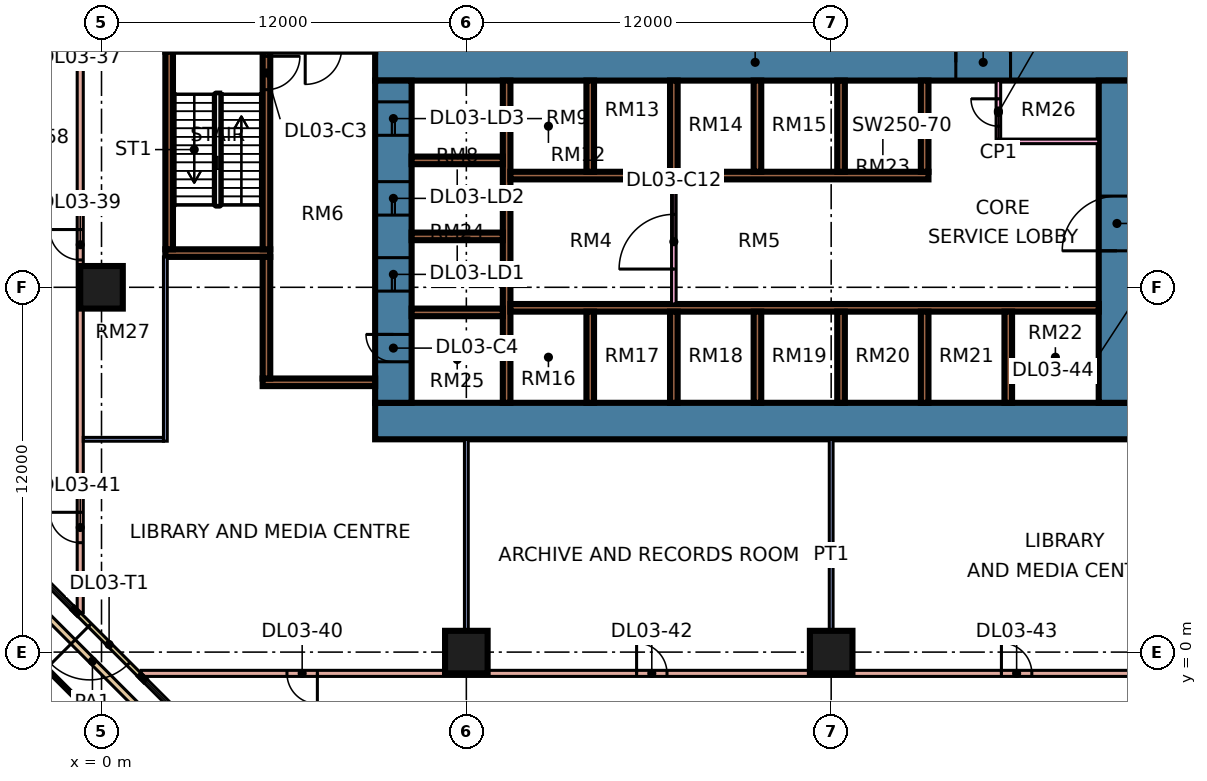
"""IFC4 building model, lengths in metres.
Left out: names, types, materials, properties, quantities, classifications, styles, units other than length and angle.
Written with IfcOpenShell. Run it as: python <this file> out.ifc"""

import sys

from ifc_helpers import new_model, si_unit, direction, frame, frame_2d, origin, origin_2d, place, context, subcontext, project, spatial, rectangle, extrude, element, fill, save


model = new_model("IFC4")
c1 = context("Model", 3, precision=1e-05, world=origin(), true_north=direction((0.0, 1.0)))
c2 = subcontext(c1, "Body", "Model", "MODEL_VIEW")
j1 = project(units=[si_unit("LENGTHUNIT", "METRE"), si_unit("PLANEANGLEUNIT", "RADIAN")], contexts=[c1])
p1 = place(None, origin())
s1 = spatial("IfcSite", under=j1, at=p1, CompositionType="ELEMENT")
p2 = place(p1, origin())
s2 = spatial("IfcBuilding", under=s1, at=p2, CompositionType="ELEMENT")
p3 = place(p2, frame((0.0, 0.0, 16.8)))
s3 = spatial("IfcBuildingStorey", under=s2, at=p3, CompositionType="ELEMENT", Elevation=16.8)
for number, where, z_axis, x_axis in (
    (1, (12.0, 0.0, 0.0), (0.0, 0.0, 1.0), (1.0, 0.0, 0.0)),
    (2, (24.0, 0.0, 0.0), (0.0, 0.0, 1.0), (1.0, 0.0, 0.0)),
    (3, (0.0, 12.0, 0.0), (0.0, 0.0, 1.0), (1.0, 0.0, 0.0)),
):
    element("IfcColumn", number, at=place(p3, frame(where, z_axis=z_axis, x_axis=x_axis)), inside=s3, PredefinedType="COLUMN", context=c2, shape_type="SweptSolid", body=[
        extrude(rectangle(XDim=1.4, YDim=1.4, at=origin_2d()), origin(), (0.0, 0.0, 1.0), 4.8),
    ])
p4 = place(p3, frame((9.0, 7.6, 0.0), z_axis=(0.0, 0.0, 1.0), x_axis=(1.0, 0.0, 0.0)))
e4 = element("IfcWall", 4, at=p4, inside=s3, PredefinedType="SHEAR", context=c2, shape_type="SweptSolid", body=[
    extrude(rectangle(XDim=25.0, YDim=1.2, at=frame_2d((12.5, 0.0))), origin(), (0.0, 0.0, 1.0), 4.8),
])
p5 = place(p3, frame((9.0, 19.4, 0.0), z_axis=(0.0, 0.0, 1.0), x_axis=(1.0, 0.0, 0.0)))
e5 = element("IfcWall", 5, at=p5, inside=s3, PredefinedType="SHEAR", context=c2, shape_type="SweptSolid", body=[
    extrude(rectangle(XDim=25.0, YDim=1.2, at=frame_2d((12.5, 0.0))), origin(), (0.0, 0.0, 1.0), 4.8),
])
p6 = place(p5, frame((19.1, 0.0, 0.0)))
e6 = element("IfcOpeningElement", 6, at=p6, cuts=e5, PredefinedType="OPENING", context=c2, shape_type="SweptSolid", body=[
    extrude(rectangle(XDim=1.8, YDim=2.4, at=frame_2d((0.9, 1.2))), frame((0.0, 0.61, 0.0), z_axis=(0.0, -1.0, 0.0), x_axis=(1.0, 0.0, 0.0)), (0.0, 0.0, 1.0), 1.22),
])
p7 = place(p3, frame((9.6, 8.2, 0.0), z_axis=(0.0, 0.0, 1.0), x_axis=(0.0, 1.0, 0.0)))
e7 = element("IfcWall", 7, at=p7, inside=s3, PredefinedType="SHEAR", context=c2, shape_type="SweptSolid", body=[
    extrude(rectangle(XDim=10.6, YDim=1.2, at=frame_2d((5.3, 0.0))), origin(), (0.0, 0.0, 1.0), 4.8),
])
p8 = place(p7, frame((3.675, 0.0, 0.0)))
e8 = element("IfcOpeningElement", 8, at=p8, cuts=e7, PredefinedType="OPENING", context=c2, shape_type="SweptSolid", body=[
    extrude(rectangle(XDim=1.1, YDim=2.2, at=frame_2d((0.55, 1.1))), frame((0.0, 0.61, 0.0), z_axis=(0.0, -1.0, 0.0), x_axis=(1.0, 0.0, 0.0)), (0.0, 0.0, 1.0), 1.22),
])
p9 = place(p7, frame((6.175, 0.0, 0.0)))
e9 = element("IfcOpeningElement", 9, at=p9, cuts=e7, PredefinedType="OPENING", context=c2, shape_type="SweptSolid", body=[
    extrude(rectangle(XDim=1.1, YDim=2.2, at=frame_2d((0.55, 1.1))), frame((0.0, 0.61, 0.0), z_axis=(0.0, -1.0, 0.0), x_axis=(1.0, 0.0, 0.0)), (0.0, 0.0, 1.0), 1.22),
])
p10 = place(p7, frame((8.8, 0.0, 0.0)))
e10 = element("IfcOpeningElement", 10, at=p10, cuts=e7, PredefinedType="OPENING", context=c2, shape_type="SweptSolid", body=[
    extrude(rectangle(XDim=1.1, YDim=2.2, at=frame_2d((0.55, 1.1))), frame((0.0, 0.61, 0.0), z_axis=(0.0, -1.0, 0.0), x_axis=(1.0, 0.0, 0.0)), (0.0, 0.0, 1.0), 1.22),
])
p11 = place(p7, frame((1.35, 0.0, 0.0)))
e11 = element("IfcOpeningElement", 11, at=p11, cuts=e7, PredefinedType="OPENING", context=c2, shape_type="SweptSolid", body=[
    extrude(rectangle(XDim=0.9, YDim=2.1, at=frame_2d((0.45, 1.05))), frame((0.0, 0.61, 0.0), z_axis=(0.0, -1.0, 0.0), x_axis=(1.0, 0.0, 0.0)), (0.0, 0.0, 1.0), 1.22),
])
p12 = place(p3, frame((33.4, 8.2, 0.0), z_axis=(0.0, 0.0, 1.0), x_axis=(0.0, 1.0, 0.0)))
e12 = element("IfcWall", 12, at=p12, inside=s3, PredefinedType="SHEAR", context=c2, shape_type="SweptSolid", body=[
    extrude(rectangle(XDim=10.6, YDim=1.2, at=frame_2d((5.3, 0.0))), origin(), (0.0, 0.0, 1.0), 4.8),
])
p13 = place(p12, frame((5.0, 0.0, 0.0)))
e13 = element("IfcOpeningElement", 13, at=p13, cuts=e12, PredefinedType="OPENING", context=c2, shape_type="SweptSolid", body=[
    extrude(rectangle(XDim=1.8, YDim=2.4, at=frame_2d((0.9, 1.2))), frame((0.0, 0.61, 0.0), z_axis=(0.0, -1.0, 0.0), x_axis=(1.0, 0.0, 0.0)), (0.0, 0.0, 1.0), 1.22),
])
p14 = place(p3, frame((13.325, 8.2, 0.0), z_axis=(0.0, 0.0, 1.0), x_axis=(0.0, 1.0, 0.0)))
e14 = element("IfcWall", 14, at=p14, inside=s3, PredefinedType="SHEAR", context=c2, shape_type="SweptSolid", body=[
    extrude(rectangle(XDim=10.6, YDim=0.25, at=frame_2d((5.3, 0.0))), origin(), (0.0, 0.0, 1.0), 4.8),
])
p15 = place(p3, frame((13.45, 11.325, 0.0), z_axis=(0.0, 0.0, 1.0), x_axis=(1.0, 0.0, 0.0)))
e15 = element("IfcWall", 15, at=p15, inside=s3, PredefinedType="SHEAR", context=c2, shape_type="SweptSolid", body=[
    extrude(rectangle(XDim=19.35, YDim=0.25, at=frame_2d((9.675, 0.0))), origin(), (0.0, 0.0, 1.0), 4.8),
])
p16 = place(p3, frame((13.45, 15.675, 0.0), z_axis=(0.0, 0.0, 1.0), x_axis=(1.0, 0.0, 0.0)))
e16 = element("IfcWall", 16, at=p16, inside=s3, PredefinedType="SHEAR", context=c2, shape_type="SweptSolid", body=[
    extrude(rectangle(XDim=13.75, YDim=0.25, at=frame_2d((6.875, 0.0))), origin(), (0.0, 0.0, 1.0), 4.8),
])
for number, where, z_axis, x_axis in (
    (17, (10.2, 11.175, 0.0), (0.0, 0.0, 1.0), (1.0, 0.0, 0.0)),
    (18, (10.2, 13.675, 0.0), (0.0, 0.0, 1.0), (1.0, 0.0, 0.0)),
    (19, (10.2, 16.175, 0.0), (0.0, 0.0, 1.0), (1.0, 0.0, 0.0)),
    (20, (16.075, 8.2, 0.0), (0.0, 0.0, 1.0), (0.0, 1.0, 0.0)),
    (21, (18.825, 8.2, 0.0), (0.0, 0.0, 1.0), (0.0, 1.0, 0.0)),
    (22, (21.575, 8.2, 0.0), (0.0, 0.0, 1.0), (0.0, 1.0, 0.0)),
    (23, (24.325, 8.2, 0.0), (0.0, 0.0, 1.0), (0.0, 1.0, 0.0)),
    (24, (27.075, 8.2, 0.0), (0.0, 0.0, 1.0), (0.0, 1.0, 0.0)),
    (25, (29.825, 8.2, 0.0), (0.0, 0.0, 1.0), (0.0, 1.0, 0.0)),
    (26, (16.075, 15.8, 0.0), (0.0, 0.0, 1.0), (0.0, 1.0, 0.0)),
    (27, (18.825, 15.8, 0.0), (0.0, 0.0, 1.0), (0.0, 1.0, 0.0)),
    (28, (21.575, 15.8, 0.0), (0.0, 0.0, 1.0), (0.0, 1.0, 0.0)),
    (29, (24.325, 15.8, 0.0), (0.0, 0.0, 1.0), (0.0, 1.0, 0.0)),
    (30, (27.075, 15.8, 0.0), (0.0, 0.0, 1.0), (0.0, 1.0, 0.0)),
):
    element("IfcWall", number, at=place(p3, frame(where, z_axis=z_axis, x_axis=x_axis)), inside=s3, PredefinedType="SHEAR", context=c2, shape_type="SweptSolid", body=[
        extrude(rectangle(XDim=3.0, YDim=0.25, at=frame_2d((1.5, 0.0))), origin(), (0.0, 0.0, 1.0), 4.8),
    ])
p17 = place(p3, frame((2.1, 13.125, 0.0), z_axis=(0.0, 0.0, 1.0), x_axis=(1.0, 0.0, 0.0)))
e31 = element("IfcWall", 31, at=p17, inside=s3, PredefinedType="SHEAR", context=c2, shape_type="SweptSolid", body=[
    extrude(rectangle(XDim=3.45, YDim=0.25, at=frame_2d((1.725, 0.0))), origin(), (0.0, 0.0, 1.0), 4.8),
])
p18 = place(p3, frame((2.225, 13.25, 0.0), z_axis=(0.0, 0.0, 1.0), x_axis=(0.0, 1.0, 0.0)))
e32 = element("IfcWall", 32, at=p18, inside=s3, PredefinedType="SHEAR", context=c2, shape_type="SweptSolid", body=[
    extrude(rectangle(XDim=6.5, YDim=0.25, at=frame_2d((3.25, 0.0))), origin(), (0.0, 0.0, 1.0), 4.8),
])
p19 = place(p3, frame((5.425, 13.25, 0.0), z_axis=(0.0, 0.0, 1.0), x_axis=(0.0, 1.0, 0.0)))
e33 = element("IfcWall", 33, at=p19, inside=s3, PredefinedType="SHEAR", context=c2, shape_type="SweptSolid", body=[
    extrude(rectangle(XDim=6.5, YDim=0.25, at=frame_2d((3.25, 0.0))), origin(), (0.0, 0.0, 1.0), 4.8),
])
p20 = place(p19, frame((5.25, 0.0, 0.0)))
e34 = element("IfcOpeningElement", 34, at=p20, cuts=e33, PredefinedType="OPENING", context=c2, shape_type="SweptSolid", body=[
    extrude(rectangle(XDim=1.1, YDim=2.2, at=frame_2d((0.55, 1.1))), frame((0.0, 0.135, 0.0), z_axis=(0.0, -1.0, 0.0), x_axis=(1.0, 0.0, 0.0)), (0.0, 0.0, 1.0), 0.27),
])
p21 = place(p3, frame((5.3, 8.875, 0.0), z_axis=(0.0, 0.0, 1.0), x_axis=(1.0, 0.0, 0.0)))
e35 = element("IfcWall", 35, at=p21, inside=s3, PredefinedType="SHEAR", context=c2, shape_type="SweptSolid", body=[
    extrude(rectangle(XDim=3.7, YDim=0.25, at=frame_2d((1.85, 0.0))), origin(), (0.0, 0.0, 1.0), 4.8),
])
p22 = place(p3, frame((5.425, 9.0, 0.0), z_axis=(0.0, 0.0, 1.0), x_axis=(0.0, 1.0, 0.0)))
e36 = element("IfcWall", 36, at=p22, inside=s3, PredefinedType="SHEAR", context=c2, shape_type="SweptSolid", body=[
    extrude(rectangle(XDim=4.0, YDim=0.25, at=frame_2d((2.0, 0.0))), origin(), (0.0, 0.0, 1.0), 4.8),
])
p23 = place(p3, frame((-0.811, 1.31, 0.0), z_axis=(0.0, 0.0, 1.0), x_axis=(0.707106781187, -0.707106781187, 0.0)))
e37 = element("IfcWall", 37, at=p23, inside=s3, PredefinedType="SOLIDWALL", context=c2, shape_type="SweptSolid", body=[
    extrude(rectangle(XDim=3.0, YDim=0.15, at=frame_2d((1.5, 0.0))), origin(), (0.0, 0.0, 1.0), 4.4),
])
p24 = place(p23, frame((0.6, 0.0, 0.0)))
e38 = element("IfcOpeningElement", 38, at=p24, cuts=e37, PredefinedType="OPENING", context=c2, shape_type="SweptSolid", body=[
    extrude(rectangle(XDim=1.8, YDim=2.4, at=frame_2d((0.9, 1.2))), frame((0.0, 0.085, 0.0), z_axis=(0.0, -1.0, 0.0), x_axis=(1.0, 0.0, 0.0)), (0.0, 0.0, 1.0), 0.17),
])
p25 = place(p3, frame((9.104, -9.7, 0.0), z_axis=(0.0, 0.0, 1.0), x_axis=(-0.707106781187, 0.707106781187, 0.0)))
e39 = element("IfcWall", 39, at=p25, inside=s3, PredefinedType="PARAPET", context=c2, shape_type="SweptSolid", body=[
    extrude(rectangle(XDim=26.592, YDim=0.2, at=frame_2d((13.296, 0.0))), origin(), (0.0, 0.0, 1.0), 0.5),
])
p26 = place(p3, frame((18.825, 11.45, 0.0), z_axis=(0.0, 0.0, 1.0), x_axis=(0.0, 1.0, 0.0)))
e40 = element("IfcWall", 40, at=p26, inside=s3, PredefinedType="PARTITIONING", context=c2, shape_type="SweptSolid", body=[
    extrude(rectangle(XDim=4.1, YDim=0.15, at=frame_2d((2.05, 0.0))), origin(), (0.0, 0.0, 1.0), 4.4),
])
p27 = place(p26, frame((1.15, 0.0, 0.0)))
e41 = element("IfcOpeningElement", 41, at=p27, cuts=e40, PredefinedType="OPENING", context=c2, shape_type="SweptSolid", body=[
    extrude(rectangle(XDim=1.8, YDim=2.4, at=frame_2d((0.9, 1.2))), frame((0.0, 0.085, 0.0), z_axis=(0.0, -1.0, 0.0), x_axis=(1.0, 0.0, 0.0)), (0.0, 0.0, 1.0), 0.17),
])
p28 = place(p3, frame((29.5, 16.8, 0.0), z_axis=(0.0, 0.0, 1.0), x_axis=(0.0, 1.0, 0.0)))
e42 = element("IfcWall", 42, at=p28, inside=s3, PredefinedType="PARTITIONING", context=c2, shape_type="SweptSolid", body=[
    extrude(rectangle(XDim=2.0, YDim=0.15, at=frame_2d((1.0, 0.0))), origin(), (0.0, 0.0, 1.0), 4.4),
])
p29 = place(p28, frame((0.5, 0.0, 0.0)))
e43 = element("IfcOpeningElement", 43, at=p29, cuts=e42, PredefinedType="OPENING", context=c2, shape_type="SweptSolid", body=[
    extrude(rectangle(XDim=0.9, YDim=2.1, at=frame_2d((0.45, 1.05))), frame((0.0, 0.085, 0.0), z_axis=(0.0, -1.0, 0.0), x_axis=(1.0, 0.0, 0.0)), (0.0, 0.0, 1.0), 0.17),
])
p30 = place(p3, frame((29.5, 16.8, 0.0), z_axis=(0.0, 0.0, 1.0), x_axis=(1.0, 0.0, 0.0)))
e44 = element("IfcWall", 44, at=p30, inside=s3, PredefinedType="PARTITIONING", context=c2, shape_type="SweptSolid", body=[
    extrude(rectangle(XDim=3.3, YDim=0.15, at=frame_2d((1.65, 0.0))), origin(), (0.0, 0.0, 1.0), 4.4),
])
p31 = place(p3, frame((-0.7, 1.304, 0.0), z_axis=(0.0, 0.0, 1.0), x_axis=(0.0, 1.0, 0.0)))
e45 = element("IfcWall", 45, at=p31, inside=s3, PredefinedType="PARTITIONING", context=c2, shape_type="SweptSolid", body=[
    extrude(rectangle(XDim=21.696, YDim=0.2, at=frame_2d((10.848, 0.0))), origin(), (0.0, 0.0, 1.0), 4.4),
])
p32 = place(p31, frame((19.346, 0.0, 0.0)))
e46 = element("IfcOpeningElement", 46, at=p32, cuts=e45, PredefinedType="OPENING", context=c2, shape_type="SweptSolid", body=[
    extrude(rectangle(XDim=1.8, YDim=2.1, at=frame_2d((0.9, 1.05))), frame((0.0, 0.11, 0.0), z_axis=(0.0, -1.0, 0.0), x_axis=(1.0, 0.0, 0.0)), (0.0, 0.0, 1.0), 0.22),
])
p33 = place(p31, frame((11.596, 0.0, 0.0)))
e47 = element("IfcOpeningElement", 47, at=p33, cuts=e45, PredefinedType="OPENING", context=c2, shape_type="SweptSolid", body=[
    extrude(rectangle(XDim=1.0, YDim=2.1, at=frame_2d((0.5, 1.05))), frame((0.0, 0.11, 0.0), z_axis=(0.0, -1.0, 0.0), x_axis=(1.0, 0.0, 0.0)), (0.0, 0.0, 1.0), 0.22),
])
p34 = place(p31, frame((2.295, 0.0, 0.0)))
e48 = element("IfcOpeningElement", 48, at=p34, cuts=e45, PredefinedType="OPENING", context=c2, shape_type="SweptSolid", body=[
    extrude(rectangle(XDim=1.0, YDim=2.1, at=frame_2d((0.5, 1.05))), frame((0.0, 0.11, 0.0), z_axis=(0.0, -1.0, 0.0), x_axis=(1.0, 0.0, 0.0)), (0.0, 0.0, 1.0), 0.22),
])
p35 = place(p3, frame((-0.6, 7.0, 0.0), z_axis=(0.0, 0.0, 1.0), x_axis=(1.0, 0.0, 0.0)))
e49 = element("IfcWall", 49, at=p35, inside=s3, PredefinedType="PARTITIONING", context=c2, shape_type="SweptSolid", body=[
    extrude(rectangle(XDim=2.638, YDim=0.125, at=frame_2d((1.319, 0.0))), origin(), (0.0, 0.0, 1.0), 4.4),
])
p36 = place(p3, frame((1.304, -0.7, 0.0), z_axis=(0.0, 0.0, 1.0), x_axis=(1.0, 0.0, 0.0)))
e50 = element("IfcWall", 50, at=p36, inside=s3, PredefinedType="PARTITIONING", context=c2, shape_type="SweptSolid", body=[
    extrude(rectangle(XDim=43.696, YDim=0.2, at=frame_2d((21.848, 0.0))), origin(), (0.0, 0.0, 1.0), 4.4),
])
p37 = place(p36, frame((38.796, 0.0, 0.0)))
e51 = element("IfcOpeningElement", 51, at=p37, cuts=e50, PredefinedType="OPENING", context=c2, shape_type="SweptSolid", body=[
    extrude(rectangle(XDim=1.0, YDim=2.1, at=frame_2d((0.5, 1.05))), frame((0.0, 0.11, 0.0), z_axis=(0.0, -1.0, 0.0), x_axis=(1.0, 0.0, 0.0)), (0.0, 0.0, 1.0), 0.22),
])
p38 = place(p36, frame((4.796, 0.0, 0.0)))
e52 = element("IfcOpeningElement", 52, at=p38, cuts=e50, PredefinedType="OPENING", context=c2, shape_type="SweptSolid", body=[
    extrude(rectangle(XDim=1.0, YDim=2.1, at=frame_2d((0.5, 1.05))), frame((0.0, 0.11, 0.0), z_axis=(0.0, -1.0, 0.0), x_axis=(1.0, 0.0, 0.0)), (0.0, 0.0, 1.0), 0.22),
])
p39 = place(p36, frame((16.296, 0.0, 0.0)))
e53 = element("IfcOpeningElement", 53, at=p39, cuts=e50, PredefinedType="OPENING", context=c2, shape_type="SweptSolid", body=[
    extrude(rectangle(XDim=1.0, YDim=2.1, at=frame_2d((0.5, 1.05))), frame((0.0, 0.11, 0.0), z_axis=(0.0, -1.0, 0.0), x_axis=(1.0, 0.0, 0.0)), (0.0, 0.0, 1.0), 0.22),
])
p40 = place(p36, frame((28.296, 0.0, 0.0)))
e54 = element("IfcOpeningElement", 54, at=p40, cuts=e50, PredefinedType="OPENING", context=c2, shape_type="SweptSolid", body=[
    extrude(rectangle(XDim=1.0, YDim=2.1, at=frame_2d((0.5, 1.05))), frame((0.0, 0.11, 0.0), z_axis=(0.0, -1.0, 0.0), x_axis=(1.0, 0.0, 0.0)), (0.0, 0.0, 1.0), 0.22),
])
p41 = place(p3, frame((2.1, 6.938, 0.0), z_axis=(0.0, 0.0, 1.0), x_axis=(0.0, 1.0, 0.0)))
e55 = element("IfcWall", 55, at=p41, inside=s3, PredefinedType="PARTITIONING", context=c2, shape_type="SweptSolid", body=[
    extrude(rectangle(XDim=6.062, YDim=0.125, at=frame_2d((3.031, 0.0))), origin(), (0.0, 0.0, 1.0), 4.4),
])
for number, where, z_axis, x_axis in (
    (56, (12.0, -0.6, 0.0), (0.0, 0.0, 1.0), (0.0, 1.0, 0.0)),
    (57, (24.0, -0.6, 0.0), (0.0, 0.0, 1.0), (0.0, 1.0, 0.0)),
):
    element("IfcWall", number, at=place(p3, frame(where, z_axis=z_axis, x_axis=x_axis)), inside=s3, PredefinedType="PARTITIONING", context=c2, shape_type="SweptSolid", body=[
        extrude(rectangle(XDim=7.6, YDim=0.125, at=frame_2d((3.8, 0.0))), origin(), (0.0, 0.0, 1.0), 4.4),
    ])
p42 = place(p24, frame((1.8, 0.0, 0.0), z_axis=(0.0, 0.0, 1.0), x_axis=(-1.0, 0.0, 0.0)))
e58 = element("IfcDoor", 58, at=p42, inside=s3, OperationType="DOUBLE_DOOR_SINGLE_SWING", PredefinedType="DOOR", context=c2, shape_type="SweptSolid", body=[
    extrude(rectangle(XDim=1.8, YDim=2.4, at=frame_2d((0.9, 1.2))), frame((0.0, 0.025, 0.0), z_axis=(0.0, -1.0, 0.0), x_axis=(1.0, 0.0, 0.0)), (0.0, 0.0, 1.0), 0.05),
])
fill(e38, e58)
p43 = place(p8, origin())
e59 = element("IfcDoor", 59, at=p43, inside=s3, OperationType="DOUBLE_DOOR_SLIDING", PredefinedType="DOOR", context=c2, shape_type="SweptSolid", body=[
    extrude(rectangle(XDim=1.1, YDim=2.2, at=frame_2d((0.55, 1.1))), frame((0.0, 0.025, 0.0), z_axis=(0.0, -1.0, 0.0), x_axis=(1.0, 0.0, 0.0)), (0.0, 0.0, 1.0), 0.05),
])
fill(e8, e59)
p44 = place(p9, origin())
e60 = element("IfcDoor", 60, at=p44, inside=s3, OperationType="DOUBLE_DOOR_SLIDING", PredefinedType="DOOR", context=c2, shape_type="SweptSolid", body=[
    extrude(rectangle(XDim=1.1, YDim=2.2, at=frame_2d((0.55, 1.1))), frame((0.0, 0.025, 0.0), z_axis=(0.0, -1.0, 0.0), x_axis=(1.0, 0.0, 0.0)), (0.0, 0.0, 1.0), 0.05),
])
fill(e9, e60)
p45 = place(p10, origin())
e61 = element("IfcDoor", 61, at=p45, inside=s3, OperationType="DOUBLE_DOOR_SLIDING", PredefinedType="DOOR", context=c2, shape_type="SweptSolid", body=[
    extrude(rectangle(XDim=1.1, YDim=2.2, at=frame_2d((0.55, 1.1))), frame((0.0, 0.025, 0.0), z_axis=(0.0, -1.0, 0.0), x_axis=(1.0, 0.0, 0.0)), (0.0, 0.0, 1.0), 0.05),
])
fill(e10, e61)
p46 = place(p13, origin())
e62 = element("IfcDoor", 62, at=p46, inside=s3, OperationType="DOUBLE_DOOR_SINGLE_SWING", PredefinedType="DOOR", context=c2, shape_type="SweptSolid", body=[
    extrude(rectangle(XDim=1.8, YDim=2.4, at=frame_2d((0.9, 1.2))), frame((0.0, 0.025, 0.0), z_axis=(0.0, -1.0, 0.0), x_axis=(1.0, 0.0, 0.0)), (0.0, 0.0, 1.0), 0.05),
])
fill(e13, e62)
p47 = place(p6, origin())
e63 = element("IfcDoor", 63, at=p47, inside=s3, OperationType="DOUBLE_DOOR_SINGLE_SWING", PredefinedType="DOOR", context=c2, shape_type="SweptSolid", body=[
    extrude(rectangle(XDim=1.8, YDim=2.4, at=frame_2d((0.9, 1.2))), frame((0.0, 0.025, 0.0), z_axis=(0.0, -1.0, 0.0), x_axis=(1.0, 0.0, 0.0)), (0.0, 0.0, 1.0), 0.05),
])
fill(e6, e63)
p48 = place(p20, origin())
e64 = element("IfcDoor", 64, at=p48, inside=s3, OperationType="SINGLE_SWING_RIGHT", PredefinedType="DOOR", context=c2, shape_type="SweptSolid", body=[
    extrude(rectangle(XDim=1.1, YDim=2.2, at=frame_2d((0.55, 1.1))), frame((0.0, 0.025, 0.0), z_axis=(0.0, -1.0, 0.0), x_axis=(1.0, 0.0, 0.0)), (0.0, 0.0, 1.0), 0.05),
])
fill(e34, e64)
p49 = place(p11, frame((0.9, 0.0, 0.0), z_axis=(0.0, 0.0, 1.0), x_axis=(-1.0, 0.0, 0.0)))
e65 = element("IfcDoor", 65, at=p49, inside=s3, OperationType="SINGLE_SWING_RIGHT", PredefinedType="DOOR", context=c2, shape_type="SweptSolid", body=[
    extrude(rectangle(XDim=0.9, YDim=2.1, at=frame_2d((0.45, 1.05))), frame((0.0, 0.025, 0.0), z_axis=(0.0, -1.0, 0.0), x_axis=(1.0, 0.0, 0.0)), (0.0, 0.0, 1.0), 0.05),
])
fill(e11, e65)
p50 = place(p27, origin())
e66 = element("IfcDoor", 66, at=p50, inside=s3, OperationType="DOUBLE_DOOR_SINGLE_SWING", PredefinedType="DOOR", context=c2, shape_type="SweptSolid", body=[
    extrude(rectangle(XDim=1.8, YDim=2.4, at=frame_2d((0.9, 1.2))), frame((0.0, 0.025, 0.0), z_axis=(0.0, -1.0, 0.0), x_axis=(1.0, 0.0, 0.0)), (0.0, 0.0, 1.0), 0.05),
])
fill(e41, e66)
p51 = place(p29, frame((0.9, 0.0, 0.0), z_axis=(0.0, 0.0, 1.0), x_axis=(-1.0, 0.0, 0.0)))
e67 = element("IfcDoor", 67, at=p51, inside=s3, OperationType="SINGLE_SWING_RIGHT", PredefinedType="DOOR", context=c2, shape_type="SweptSolid", body=[
    extrude(rectangle(XDim=0.9, YDim=2.1, at=frame_2d((0.45, 1.05))), frame((0.0, 0.025, 0.0), z_axis=(0.0, -1.0, 0.0), x_axis=(1.0, 0.0, 0.0)), (0.0, 0.0, 1.0), 0.05),
])
fill(e43, e67)
p52 = place(p33, frame((1.0, 0.0, 0.0), z_axis=(0.0, 0.0, 1.0), x_axis=(-1.0, 0.0, 0.0)))
e68 = element("IfcDoor", 68, at=p52, inside=s3, OperationType="SINGLE_SWING_RIGHT", PredefinedType="DOOR", context=c2, shape_type="SweptSolid", body=[
    extrude(rectangle(XDim=1.0, YDim=2.1, at=frame_2d((0.5, 1.05))), frame((0.0, 0.025, 0.0), z_axis=(0.0, -1.0, 0.0), x_axis=(1.0, 0.0, 0.0)), (0.0, 0.0, 1.0), 0.05),
])
fill(e47, e68)
p53 = place(p38, origin())
e69 = element("IfcDoor", 69, at=p53, inside=s3, OperationType="SINGLE_SWING_RIGHT", PredefinedType="DOOR", context=c2, shape_type="SweptSolid", body=[
    extrude(rectangle(XDim=1.0, YDim=2.1, at=frame_2d((0.5, 1.05))), frame((0.0, 0.025, 0.0), z_axis=(0.0, -1.0, 0.0), x_axis=(1.0, 0.0, 0.0)), (0.0, 0.0, 1.0), 0.05),
])
fill(e52, e69)
p54 = place(p34, frame((1.0, 0.0, 0.0), z_axis=(0.0, 0.0, 1.0), x_axis=(-1.0, 0.0, 0.0)))
e70 = element("IfcDoor", 70, at=p54, inside=s3, OperationType="SINGLE_SWING_RIGHT", PredefinedType="DOOR", context=c2, shape_type="SweptSolid", body=[
    extrude(rectangle(XDim=1.0, YDim=2.1, at=frame_2d((0.5, 1.05))), frame((0.0, 0.025, 0.0), z_axis=(0.0, -1.0, 0.0), x_axis=(1.0, 0.0, 0.0)), (0.0, 0.0, 1.0), 0.05),
])
fill(e48, e70)
p55 = place(p39, origin())
e71 = element("IfcDoor", 71, at=p55, inside=s3, OperationType="SINGLE_SWING_LEFT", PredefinedType="DOOR", context=c2, shape_type="SweptSolid", body=[
    extrude(rectangle(XDim=1.0, YDim=2.1, at=frame_2d((0.5, 1.05))), frame((0.0, 0.025, 0.0), z_axis=(0.0, -1.0, 0.0), x_axis=(1.0, 0.0, 0.0)), (0.0, 0.0, 1.0), 0.05),
])
fill(e53, e71)
p56 = place(p40, origin())
e72 = element("IfcDoor", 72, at=p56, inside=s3, OperationType="SINGLE_SWING_LEFT", PredefinedType="DOOR", context=c2, shape_type="SweptSolid", body=[
    extrude(rectangle(XDim=1.0, YDim=2.1, at=frame_2d((0.5, 1.05))), frame((0.0, 0.025, 0.0), z_axis=(0.0, -1.0, 0.0), x_axis=(1.0, 0.0, 0.0)), (0.0, 0.0, 1.0), 0.05),
])
fill(e54, e72)
save(model, sys.argv[1])
